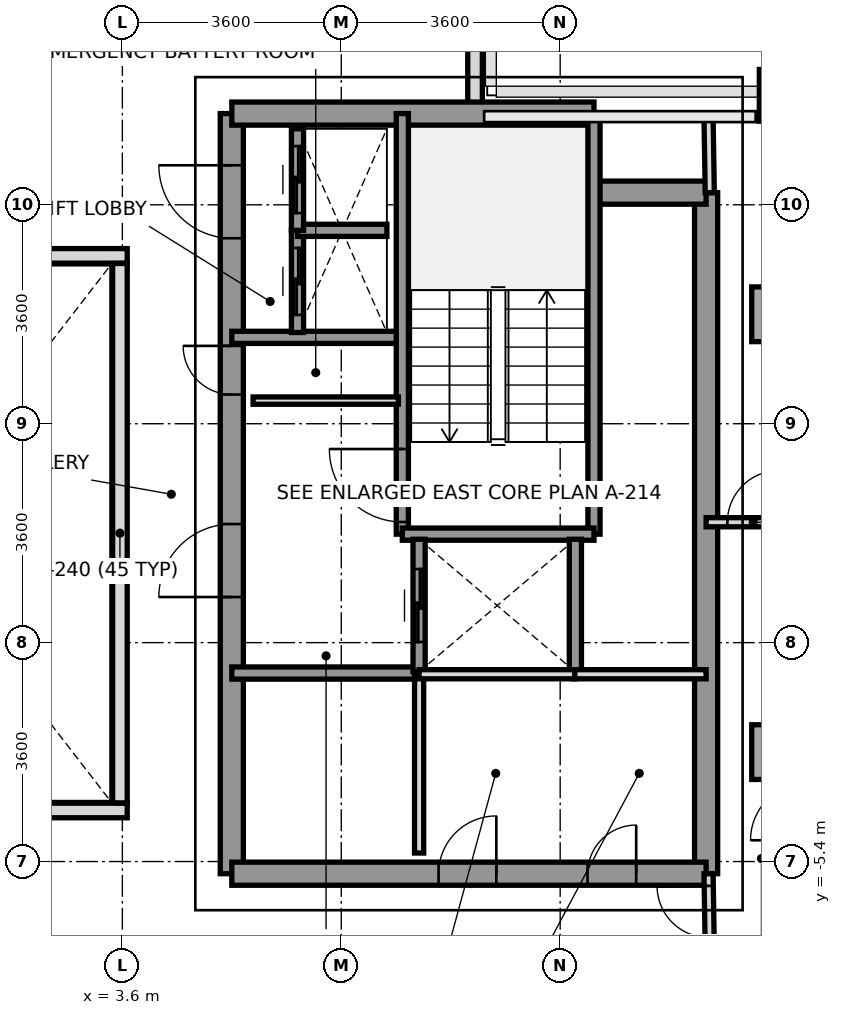
"""IFC4 building model, lengths in metres.
Left out: names, types, materials, properties, quantities, classifications, styles, units other than length and angle.
Written with IfcOpenShell. Run it as: python <this file> out.ifc"""

import sys

from ifc_helpers import new_model, si_unit, direction, frame, frame_2d, origin, origin_2d, place, context, subcontext, project, spatial, rectangle, extrude, source, transform, mapped, element, fill, save


model = new_model("IFC4")
c1 = context("Model", 3, precision=1e-05, world=origin(), true_north=direction((0.0, 1.0)))
c2 = subcontext(c1, "Body", "Model", "MODEL_VIEW")
j1 = project(units=[si_unit("LENGTHUNIT", "METRE"), si_unit("PLANEANGLEUNIT", "RADIAN")], contexts=[c1])
p1 = place(None, origin())
s1 = spatial("IfcSite", under=j1, at=p1, CompositionType="ELEMENT")
p2 = place(p1, origin())
s2 = spatial("IfcBuilding", under=s1, at=p2, CompositionType="ELEMENT")
p3 = place(p2, frame((0.0, 0.0, 194.4)))
s3 = spatial("IfcBuildingStorey", under=s2, at=p3, CompositionType="ELEMENT", Elevation=194.4)
m1 = source(origin(), c2, "Body", "SweptSolid", [
    extrude(rectangle(XDim=0.9, YDim=0.9, at=origin_2d()), origin(), (0.0, 0.0, 1.0), 3.2),
])
for number, where, z_axis, x_axis in (
    (1, (14.4, -3.6, 0.0), (0.0, 0.0, 1.0), (1.0, 0.0, 0.0)),
    (2, (14.4, 3.6, 0.0), (0.0, 0.0, 1.0), (1.0, 0.0, 0.0)),
):
    element("IfcColumn", number, at=place(p3, frame(where, z_axis=z_axis, x_axis=x_axis)), inside=s3, PredefinedType="COLUMN", context=c2, shape_type="MappedRepresentation", body=[
        mapped(m1, transform((0.0, 0.0, 0.0), x_axis=(1.0, 0.0, 0.0), y_axis=(0.0, 1.0, 0.0), z_axis=(0.0, 0.0, 1.0), scale=1.0)),
    ])
m2 = source(origin(), c2, "Body", "SweptSolid", [
    extrude(rectangle(XDim=0.65, YDim=0.85, at=origin_2d()), origin(), (0.0, 0.0, 1.0), 3.2),
])
p4 = place(p3, frame((14.4, 7.2, 0.0), z_axis=(0.0, 0.0, 1.0), x_axis=(1.0, 0.0, 0.0)))
e3 = element("IfcColumn", 3, at=p4, inside=s3, PredefinedType="COLUMN", context=c2, shape_type="MappedRepresentation", body=[
    mapped(m2, transform((0.0, 0.0, 0.0), x_axis=(1.0, 0.0, 0.0), y_axis=(0.0, 1.0, 0.0), z_axis=(0.0, 0.0, 1.0), scale=1.0)),
])
p5 = place(p3, frame((9.4, 8.547, 0.0), z_axis=(0.0, 0.0, 1.0), x_axis=(0.0, -1.0, 0.0)))
e4 = element("IfcWall", 4, at=p5, inside=s3, PredefinedType="PARAPET", context=c2, shape_type="SweptSolid", body=[
    extrude(rectangle(XDim=1.594, YDim=0.24, at=frame_2d((0.797, 0.0))), origin(), (0.0, 0.0, 1.0), 1.15),
])
p6 = place(p3, frame((13.2, -5.6, 0.0), z_axis=(0.0, 0.0, 1.0), x_axis=(0.0, 1.0, 0.0)))
e5 = element("IfcWall", 5, at=p6, inside=s3, PredefinedType="SHEAR", context=c2, shape_type="SweptSolid", body=[
    extrude(rectangle(XDim=11.2, YDim=0.38, at=frame_2d((5.6, 0.0))), origin(), (0.0, 0.0, 1.0), 3.2),
])
p7 = place(p3, frame((5.4, -5.6, 0.0), z_axis=(0.0, 0.0, 1.0), x_axis=(0.0, 1.0, 0.0)))
e6 = element("IfcWall", 6, at=p7, inside=s3, PredefinedType="SHEAR", context=c2, shape_type="SweptSolid", body=[
    extrude(rectangle(XDim=12.5, YDim=0.38, at=frame_2d((6.25, 0.0))), origin(), (0.0, 0.0, 1.0), 3.2),
])
p8 = place(p7, frame((4.55, 0.0, 0.0)))
e7 = element("IfcOpeningElement", 7, at=p8, cuts=e6, PredefinedType="OPENING", context=c2, shape_type="SweptSolid", body=[
    extrude(rectangle(XDim=1.2, YDim=2.2, at=frame_2d((0.6, 1.1))), frame((0.0, 0.2, 0.0), z_axis=(0.0, -1.0, 0.0), x_axis=(1.0, 0.0, 0.0)), (0.0, 0.0, 1.0), 0.4),
])
p9 = place(p7, frame((10.45, 0.0, 0.0)))
e8 = element("IfcOpeningElement", 8, at=p9, cuts=e6, PredefinedType="OPENING", context=c2, shape_type="SweptSolid", body=[
    extrude(rectangle(XDim=1.2, YDim=2.2, at=frame_2d((0.6, 1.1))), frame((0.0, 0.2, 0.0), z_axis=(0.0, -1.0, 0.0), x_axis=(1.0, 0.0, 0.0)), (0.0, 0.0, 1.0), 0.4),
])
p10 = place(p7, frame((7.88, 0.0, 0.0)))
e9 = element("IfcOpeningElement", 9, at=p10, cuts=e6, PredefinedType="OPENING", context=c2, shape_type="SweptSolid", body=[
    extrude(rectangle(XDim=0.8, YDim=2.1, at=frame_2d((0.4, 1.05))), frame((0.0, 0.2, 0.0), z_axis=(0.0, -1.0, 0.0), x_axis=(1.0, 0.0, 0.0)), (0.0, 0.0, 1.0), 0.4),
])
p11 = place(p3, frame((5.4, 6.9, 0.0), z_axis=(0.0, 0.0, 1.0), x_axis=(1.0, 0.0, 0.0)))
e10 = element("IfcWall", 10, at=p11, inside=s3, PredefinedType="SHEAR", context=c2, shape_type="SweptSolid", body=[
    extrude(rectangle(XDim=5.956, YDim=0.38, at=frame_2d((2.978, 0.0))), origin(), (0.0, 0.0, 1.0), 3.2),
])
p12 = place(p3, frame((11.356, 5.6, 0.0), z_axis=(0.0, 0.0, 1.0), x_axis=(1.0, 0.0, 0.0)))
e11 = element("IfcWall", 11, at=p12, inside=s3, PredefinedType="SHEAR", context=c2, shape_type="SweptSolid", body=[
    extrude(rectangle(XDim=1.844, YDim=0.38, at=frame_2d((0.922, 0.0))), origin(), (0.0, 0.0, 1.0), 3.2),
])
p13 = place(p3, frame((5.4, -5.6, 0.0), z_axis=(0.0, 0.0, 1.0), x_axis=(1.0, 0.0, 0.0)))
e12 = element("IfcWall", 12, at=p13, inside=s3, PredefinedType="SHEAR", context=c2, shape_type="SweptSolid", body=[
    extrude(rectangle(XDim=7.8, YDim=0.38, at=frame_2d((3.9, 0.0))), origin(), (0.0, 0.0, 1.0), 3.2),
])
p14 = place(p13, frame((5.85, 0.0, 0.0)))
e13 = element("IfcOpeningElement", 13, at=p14, cuts=e12, PredefinedType="OPENING", context=c2, shape_type="SweptSolid", body=[
    extrude(rectangle(XDim=0.8, YDim=2.1, at=frame_2d((0.4, 1.05))), frame((0.0, 0.2, 0.0), z_axis=(0.0, -1.0, 0.0), x_axis=(1.0, 0.0, 0.0)), (0.0, 0.0, 1.0), 0.4),
])
p15 = place(p13, frame((3.4, 0.0, 0.0)))
e14 = element("IfcOpeningElement", 14, at=p15, cuts=e12, PredefinedType="OPENING", context=c2, shape_type="SweptSolid", body=[
    extrude(rectangle(XDim=0.95, YDim=2.15, at=frame_2d((0.475, 1.075))), frame((0.0, 0.2, 0.0), z_axis=(0.0, -1.0, 0.0), x_axis=(1.0, 0.0, 0.0)), (0.0, 0.0, 1.0), 0.4),
])
p16 = place(p3, frame((5.4, 3.22, 0.0), z_axis=(0.0, 0.0, 1.0), x_axis=(1.0, 0.0, 0.0)))
e15 = element("IfcWall", 15, at=p16, inside=s3, PredefinedType="SOLIDWALL", context=c2, shape_type="SweptSolid", body=[
    extrude(rectangle(XDim=2.78, YDim=0.2, at=frame_2d((1.39, 0.0))), origin(), (0.0, 0.0, 1.0), 3.2),
])
p17 = place(p3, frame((5.4, -2.3, 0.0), z_axis=(0.0, 0.0, 1.0), x_axis=(1.0, 0.0, 0.0)))
e16 = element("IfcWall", 16, at=p17, inside=s3, PredefinedType="SOLIDWALL", context=c2, shape_type="SweptSolid", body=[
    extrude(rectangle(XDim=3.08, YDim=0.2, at=frame_2d((1.54, 0.0))), origin(), (0.0, 0.0, 1.0), 3.2),
])
p18 = place(p3, frame((8.204, -0.016, 0.0), z_axis=(0.0, 0.0, 1.0), x_axis=(0.0, 1.0, 0.0)))
e17 = element("IfcWall", 17, at=p18, inside=s3, PredefinedType="SOLIDWALL", context=c2, shape_type="SweptSolid", body=[
    extrude(rectangle(XDim=6.916, YDim=0.2, at=frame_2d((3.458, 0.0))), origin(), (0.0, 0.0, 1.0), 3.2),
])
p19 = place(p18, frame((0.2, 0.0, 0.0)))
e18 = element("IfcOpeningElement", 18, at=p19, cuts=e17, PredefinedType="OPENING", context=c2, shape_type="SweptSolid", body=[
    extrude(rectangle(XDim=1.2, YDim=2.2, at=frame_2d((0.6, 1.1))), frame((0.0, 0.11, 0.0), z_axis=(0.0, -1.0, 0.0), x_axis=(1.0, 0.0, 0.0)), (0.0, 0.0, 1.0), 0.22),
])
p20 = place(p3, frame((11.356, -0.016, 0.0), z_axis=(0.0, 0.0, 1.0), x_axis=(0.0, 1.0, 0.0)))
e19 = element("IfcWall", 19, at=p20, inside=s3, PredefinedType="SOLIDWALL", context=c2, shape_type="SweptSolid", body=[
    extrude(rectangle(XDim=6.916, YDim=0.2, at=frame_2d((3.458, 0.0))), origin(), (0.0, 0.0, 1.0), 3.2),
])
p21 = place(p3, frame((8.204, -0.016, 0.0), z_axis=(0.0, 0.0, 1.0), x_axis=(1.0, 0.0, 0.0)))
e20 = element("IfcWall", 20, at=p21, inside=s3, PredefinedType="SOLIDWALL", context=c2, shape_type="SweptSolid", body=[
    extrude(rectangle(XDim=3.152, YDim=0.2, at=frame_2d((1.576, 0.0))), origin(), (0.0, 0.0, 1.0), 3.2),
])
p22 = place(p3, frame((8.48, -2.28, 0.0), z_axis=(0.0, 0.0, 1.0), x_axis=(0.0, 1.0, 0.0)))
e21 = element("IfcWall", 21, at=p22, inside=s3, PredefinedType="SOLIDWALL", context=c2, shape_type="SweptSolid", body=[
    extrude(rectangle(XDim=2.18, YDim=0.2, at=frame_2d((1.09, 0.0))), origin(), (0.0, 0.0, 1.0), 3.2),
])
p23 = place(p22, frame((0.49, 0.0, 0.0)))
e22 = element("IfcOpeningElement", 22, at=p23, cuts=e21, PredefinedType="OPENING", context=c2, shape_type="SweptSolid", body=[
    extrude(rectangle(XDim=1.2, YDim=2.2, at=frame_2d((0.6, 1.1))), frame((0.0, 0.11, 0.0), z_axis=(0.0, -1.0, 0.0), x_axis=(1.0, 0.0, 0.0)), (0.0, 0.0, 1.0), 0.22),
])
p24 = place(p3, frame((11.05, -2.28, 0.0), z_axis=(0.0, 0.0, 1.0), x_axis=(0.0, 1.0, 0.0)))
e23 = element("IfcWall", 23, at=p24, inside=s3, PredefinedType="SOLIDWALL", context=c2, shape_type="SweptSolid", body=[
    extrude(rectangle(XDim=2.18, YDim=0.2, at=frame_2d((1.09, 0.0))), origin(), (0.0, 0.0, 1.0), 3.2),
])
p25 = place(p3, frame((6.48, 3.3, 0.0), z_axis=(0.0, 0.0, 1.0), x_axis=(0.0, 1.0, 0.0)))
e24 = element("IfcWall", 24, at=p25, inside=s3, PredefinedType="SOLIDWALL", context=c2, shape_type="SweptSolid", body=[
    extrude(rectangle(XDim=1.68, YDim=0.2, at=frame_2d((0.84, 0.0))), origin(), (0.0, 0.0, 1.0), 3.2),
])
p26 = place(p25, frame((0.29, 0.0, 0.0)))
e25 = element("IfcOpeningElement", 25, at=p26, cuts=e24, PredefinedType="OPENING", context=c2, shape_type="SweptSolid", body=[
    extrude(rectangle(XDim=1.1, YDim=2.2, at=frame_2d((0.55, 1.1))), frame((0.0, 0.11, 0.0), z_axis=(0.0, -1.0, 0.0), x_axis=(1.0, 0.0, 0.0)), (0.0, 0.0, 1.0), 0.22),
])
p27 = place(p3, frame((6.48, 4.98, 0.0), z_axis=(0.0, 0.0, 1.0), x_axis=(1.0, 0.0, 0.0)))
e26 = element("IfcWall", 26, at=p27, inside=s3, PredefinedType="SOLIDWALL", context=c2, shape_type="SweptSolid", body=[
    extrude(rectangle(XDim=1.47, YDim=0.2, at=frame_2d((0.735, 0.0))), origin(), (0.0, 0.0, 1.0), 3.2),
])
p28 = place(p3, frame((6.48, 4.98, 0.0), z_axis=(0.0, 0.0, 1.0), x_axis=(0.0, 1.0, 0.0)))
e27 = element("IfcWall", 27, at=p28, inside=s3, PredefinedType="SOLIDWALL", context=c2, shape_type="SweptSolid", body=[
    extrude(rectangle(XDim=1.67, YDim=0.2, at=frame_2d((0.835, 0.0))), origin(), (0.0, 0.0, 1.0), 3.2),
])
p29 = place(p28, frame((0.285, 0.0, 0.0)))
e28 = element("IfcOpeningElement", 28, at=p29, cuts=e27, PredefinedType="OPENING", context=c2, shape_type="SweptSolid", body=[
    extrude(rectangle(XDim=1.1, YDim=2.2, at=frame_2d((0.55, 1.1))), frame((0.0, 0.11, 0.0), z_axis=(0.0, -1.0, 0.0), x_axis=(1.0, 0.0, 0.0)), (0.0, 0.0, 1.0), 0.22),
])
p30 = place(p3, frame((5.75, 2.18, 0.0), z_axis=(0.0, 0.0, 1.0), x_axis=(1.0, 0.0, 0.0)))
e29 = element("IfcWall", 29, at=p30, inside=s3, PredefinedType="PARTITIONING", context=c2, shape_type="SweptSolid", body=[
    extrude(rectangle(XDim=2.39, YDim=0.12, at=frame_2d((1.195, 0.0))), origin(), (0.0, 0.0, 1.0), 2.3),
])
p31 = place(p3, frame((11.02, -2.32, 0.0), z_axis=(0.0, 0.0, 1.0), x_axis=(1.0, 0.0, 0.0)))
e30 = element("IfcWall", 30, at=p31, inside=s3, PredefinedType="PARTITIONING", context=c2, shape_type="SweptSolid", body=[
    extrude(rectangle(XDim=2.18, YDim=0.15, at=frame_2d((1.09, 0.0))), origin(), (0.0, 0.0, 1.0), 3.2),
])
p32 = place(p3, frame((8.48, -5.26, 0.0), z_axis=(0.0, 0.0, 1.0), x_axis=(0.0, 1.0, 0.0)))
e31 = element("IfcWall", 31, at=p32, inside=s3, PredefinedType="PARTITIONING", context=c2, shape_type="SweptSolid", body=[
    extrude(rectangle(XDim=2.94, YDim=0.15, at=frame_2d((1.47, 0.0))), origin(), (0.0, 0.0, 1.0), 3.2),
])
p33 = place(p3, frame((8.48, -2.32, 0.0), z_axis=(0.0, 0.0, 1.0), x_axis=(1.0, 0.0, 0.0)))
e32 = element("IfcWall", 32, at=p33, inside=s3, PredefinedType="PARTITIONING", context=c2, shape_type="SweptSolid", body=[
    extrude(rectangle(XDim=2.56, YDim=0.15, at=frame_2d((1.28, 0.0))), origin(), (0.0, 0.0, 1.0), 3.2),
])
p34 = place(p3, frame((13.26, 5.6, 0.0), z_axis=(0.0, 0.0, 1.0), x_axis=(-0.016013571389, 0.999871774545, 0.0)))
e33 = element("IfcWall", 33, at=p34, inside=s3, PredefinedType="PARTITIONING", context=c2, shape_type="SweptSolid", body=[
    extrude(rectangle(XDim=1.25, YDim=0.15, at=frame_2d((0.625, 0.0))), origin(), (0.0, 0.0, 1.0), 3.2),
])
p35 = place(p3, frame((13.26, -6.85, 0.0), z_axis=(0.0, 0.0, 1.0), x_axis=(-0.016013571389, 0.999871774545, 0.0)))
e34 = element("IfcWall", 34, at=p35, inside=s3, PredefinedType="PARTITIONING", context=c2, shape_type="SweptSolid", body=[
    extrude(rectangle(XDim=1.25, YDim=0.15, at=frame_2d((0.625, 0.0))), origin(), (0.0, 0.0, 1.0), 3.2),
])
p36 = place(p35, frame((0.2, 0.0, 0.0)))
e35 = element("IfcOpeningElement", 35, at=p36, cuts=e34, PredefinedType="OPENING", context=c2, shape_type="SweptSolid", body=[
    extrude(rectangle(XDim=0.85, YDim=2.1, at=frame_2d((0.425, 1.05))), frame((0.0, 0.085, 0.0), z_axis=(0.0, -1.0, 0.0), x_axis=(1.0, 0.0, 0.0)), (0.0, 0.0, 1.0), 0.17),
])
p37 = place(p3, frame((13.2, 0.18, 0.0), z_axis=(0.0, 0.0, 1.0), x_axis=(1.0, 0.0, 0.0)))
e36 = element("IfcWall", 36, at=p37, inside=s3, PredefinedType="PARTITIONING", context=c2, shape_type="SweptSolid", body=[
    extrude(rectangle(XDim=1.7, YDim=0.15, at=frame_2d((0.85, 0.0))), origin(), (0.0, 0.0, 1.0), 2.8),
])
p38 = place(p37, frame((0.35, 0.0, 0.0)))
e37 = element("IfcOpeningElement", 37, at=p38, cuts=e36, PredefinedType="OPENING", context=c2, shape_type="SweptSolid", body=[
    extrude(rectangle(XDim=0.85, YDim=2.1, at=frame_2d((0.425, 1.05))), frame((0.0, 0.085, 0.0), z_axis=(0.0, -1.0, 0.0), x_axis=(1.0, 0.0, 0.0)), (0.0, 0.0, 1.0), 0.17),
])
for number, where, z_axis, x_axis in (
    (38, (-3.68, -4.56, 0.0), (0.0, 0.0, 1.0), (1.0, 0.0, 0.0)),
    (39, (-3.68, 4.56, 0.0), (0.0, 0.0, 1.0), (1.0, 0.0, 0.0)),
):
    element("IfcWall", number, at=place(p3, frame(where, z_axis=z_axis, x_axis=x_axis)), inside=s3, PredefinedType="PARAPET", context=c2, shape_type="SweptSolid", body=[
        extrude(rectangle(XDim=7.36, YDim=0.24, at=frame_2d((3.68, 0.0))), origin(), (0.0, 0.0, 1.0), 1.15),
    ])
p39 = place(p3, frame((3.56, -4.435, 0.0), z_axis=(0.0, 0.0, 1.0), x_axis=(0.0, 1.0, 0.0)))
e40 = element("IfcWall", 40, at=p39, inside=s3, PredefinedType="PARAPET", context=c2, shape_type="SweptSolid", body=[
    extrude(rectangle(XDim=8.87, YDim=0.24, at=frame_2d((4.435, 0.0))), origin(), (0.0, 0.0, 1.0), 1.15),
])
m3 = source(origin(), c2, "Body", "SweptSolid", [
    extrude(rectangle(XDim=1.2, YDim=2.2, at=frame_2d((0.6, 1.1))), frame((0.0, 0.025, 0.0), z_axis=(0.0, -1.0, 0.0), x_axis=(1.0, 0.0, 0.0)), (0.0, 0.0, 1.0), 0.05),
])
p40 = place(p19, origin())
e41 = element("IfcDoor", 41, at=p40, inside=s3, OperationType="SINGLE_SWING_RIGHT", PredefinedType="DOOR", context=c2, shape_type="MappedRepresentation", body=[
    mapped(m3, transform((0.0, 0.0, 0.0), x_axis=(1.0, 0.0, 0.0), y_axis=(0.0, 1.0, 0.0), z_axis=(0.0, 0.0, 1.0), scale=1.0)),
])
fill(e18, e41)
p41 = place(p8, origin())
e42 = element("IfcDoor", 42, at=p41, inside=s3, OperationType="SINGLE_SWING_LEFT", PredefinedType="DOOR", context=c2, shape_type="MappedRepresentation", body=[
    mapped(m3, transform((0.0, 0.0, 0.0), x_axis=(1.0, 0.0, 0.0), y_axis=(0.0, 1.0, 0.0), z_axis=(0.0, 0.0, 1.0), scale=1.0)),
])
fill(e7, e42)
p42 = place(p9, origin())
e43 = element("IfcDoor", 43, at=p42, inside=s3, OperationType="SINGLE_SWING_RIGHT", PredefinedType="DOOR", context=c2, shape_type="MappedRepresentation", body=[
    mapped(m3, transform((0.0, 0.0, 0.0), x_axis=(1.0, 0.0, 0.0), y_axis=(0.0, 1.0, 0.0), z_axis=(0.0, 0.0, 1.0), scale=1.0)),
])
fill(e8, e43)
m4 = source(origin(), c2, "Body", "SweptSolid", [
    extrude(rectangle(XDim=0.8, YDim=2.1, at=frame_2d((0.4, 1.05))), frame((0.0, 0.025, 0.0), z_axis=(0.0, -1.0, 0.0), x_axis=(1.0, 0.0, 0.0)), (0.0, 0.0, 1.0), 0.05),
])
p43 = place(p10, origin())
e44 = element("IfcDoor", 44, at=p43, inside=s3, OperationType="SINGLE_SWING_RIGHT", PredefinedType="DOOR", context=c2, shape_type="MappedRepresentation", body=[
    mapped(m4, transform((0.0, 0.0, 0.0), x_axis=(1.0, 0.0, 0.0), y_axis=(0.0, 1.0, 0.0), z_axis=(0.0, 0.0, 1.0), scale=1.0)),
])
fill(e9, e44)
p44 = place(p14, origin())
e45 = element("IfcDoor", 45, at=p44, inside=s3, OperationType="SINGLE_SWING_RIGHT", PredefinedType="DOOR", context=c2, shape_type="MappedRepresentation", body=[
    mapped(m4, transform((0.0, 0.0, 0.0), x_axis=(1.0, 0.0, 0.0), y_axis=(0.0, 1.0, 0.0), z_axis=(0.0, 0.0, 1.0), scale=1.0)),
])
fill(e13, e45)
m5 = source(origin(), c2, "Body", "SweptSolid", [
    extrude(rectangle(XDim=0.95, YDim=2.15, at=frame_2d((0.475, 1.075))), frame((0.0, 0.025, 0.0), z_axis=(0.0, -1.0, 0.0), x_axis=(1.0, 0.0, 0.0)), (0.0, 0.0, 1.0), 0.05),
])
p45 = place(p15, origin())
e46 = element("IfcDoor", 46, at=p45, inside=s3, OperationType="SINGLE_SWING_RIGHT", PredefinedType="DOOR", context=c2, shape_type="MappedRepresentation", body=[
    mapped(m5, transform((0.0, 0.0, 0.0), x_axis=(1.0, 0.0, 0.0), y_axis=(0.0, 1.0, 0.0), z_axis=(0.0, 0.0, 1.0), scale=1.0)),
])
fill(e14, e46)
p46 = place(p23, origin())
e47 = element("IfcDoor", 47, at=p46, inside=s3, OperationType="SLIDING_TO_RIGHT", PredefinedType="DOOR", context=c2, shape_type="MappedRepresentation", body=[
    mapped(m3, transform((0.0, 0.0, 0.0), x_axis=(1.0, 0.0, 0.0), y_axis=(0.0, 1.0, 0.0), z_axis=(0.0, 0.0, 1.0), scale=1.0)),
])
fill(e22, e47)
m6 = source(origin(), c2, "Body", "SweptSolid", [
    extrude(rectangle(XDim=1.1, YDim=2.2, at=frame_2d((0.55, 1.1))), frame((0.0, 0.025, 0.0), z_axis=(0.0, -1.0, 0.0), x_axis=(1.0, 0.0, 0.0)), (0.0, 0.0, 1.0), 0.05),
])
p47 = place(p26, origin())
e48 = element("IfcDoor", 48, at=p47, inside=s3, OperationType="SLIDING_TO_LEFT", PredefinedType="DOOR", context=c2, shape_type="MappedRepresentation", body=[
    mapped(m6, transform((0.0, 0.0, 0.0), x_axis=(1.0, 0.0, 0.0), y_axis=(0.0, 1.0, 0.0), z_axis=(0.0, 0.0, 1.0), scale=1.0)),
])
fill(e25, e48)
p48 = place(p29, origin())
e49 = element("IfcDoor", 49, at=p48, inside=s3, OperationType="SLIDING_TO_LEFT", PredefinedType="DOOR", context=c2, shape_type="MappedRepresentation", body=[
    mapped(m6, transform((0.0, 0.0, 0.0), x_axis=(1.0, 0.0, 0.0), y_axis=(0.0, 1.0, 0.0), z_axis=(0.0, 0.0, 1.0), scale=1.0)),
])
fill(e28, e49)
m7 = source(origin(), c2, "Body", "SweptSolid", [
    extrude(rectangle(XDim=0.85, YDim=2.1, at=frame_2d((0.425, 1.05))), frame((0.0, 0.025, 0.0), z_axis=(0.0, -1.0, 0.0), x_axis=(1.0, 0.0, 0.0)), (0.0, 0.0, 1.0), 0.05),
])
p49 = place(p36, origin())
e50 = element("IfcDoor", 50, at=p49, inside=s3, OperationType="SINGLE_SWING_RIGHT", PredefinedType="DOOR", context=c2, shape_type="MappedRepresentation", body=[
    mapped(m7, transform((0.0, 0.0, 0.0), x_axis=(1.0, 0.0, 0.0), y_axis=(0.0, 1.0, 0.0), z_axis=(0.0, 0.0, 1.0), scale=1.0)),
])
fill(e35, e50)
p50 = place(p38, origin())
e51 = element("IfcDoor", 51, at=p50, inside=s3, OperationType="SINGLE_SWING_RIGHT", PredefinedType="DOOR", context=c2, shape_type="MappedRepresentation", body=[
    mapped(m7, transform((0.0, 0.0, 0.0), x_axis=(1.0, 0.0, 0.0), y_axis=(0.0, 1.0, 0.0), z_axis=(0.0, 0.0, 1.0), scale=1.0)),
])
fill(e37, e51)
save(model, sys.argv[1])
